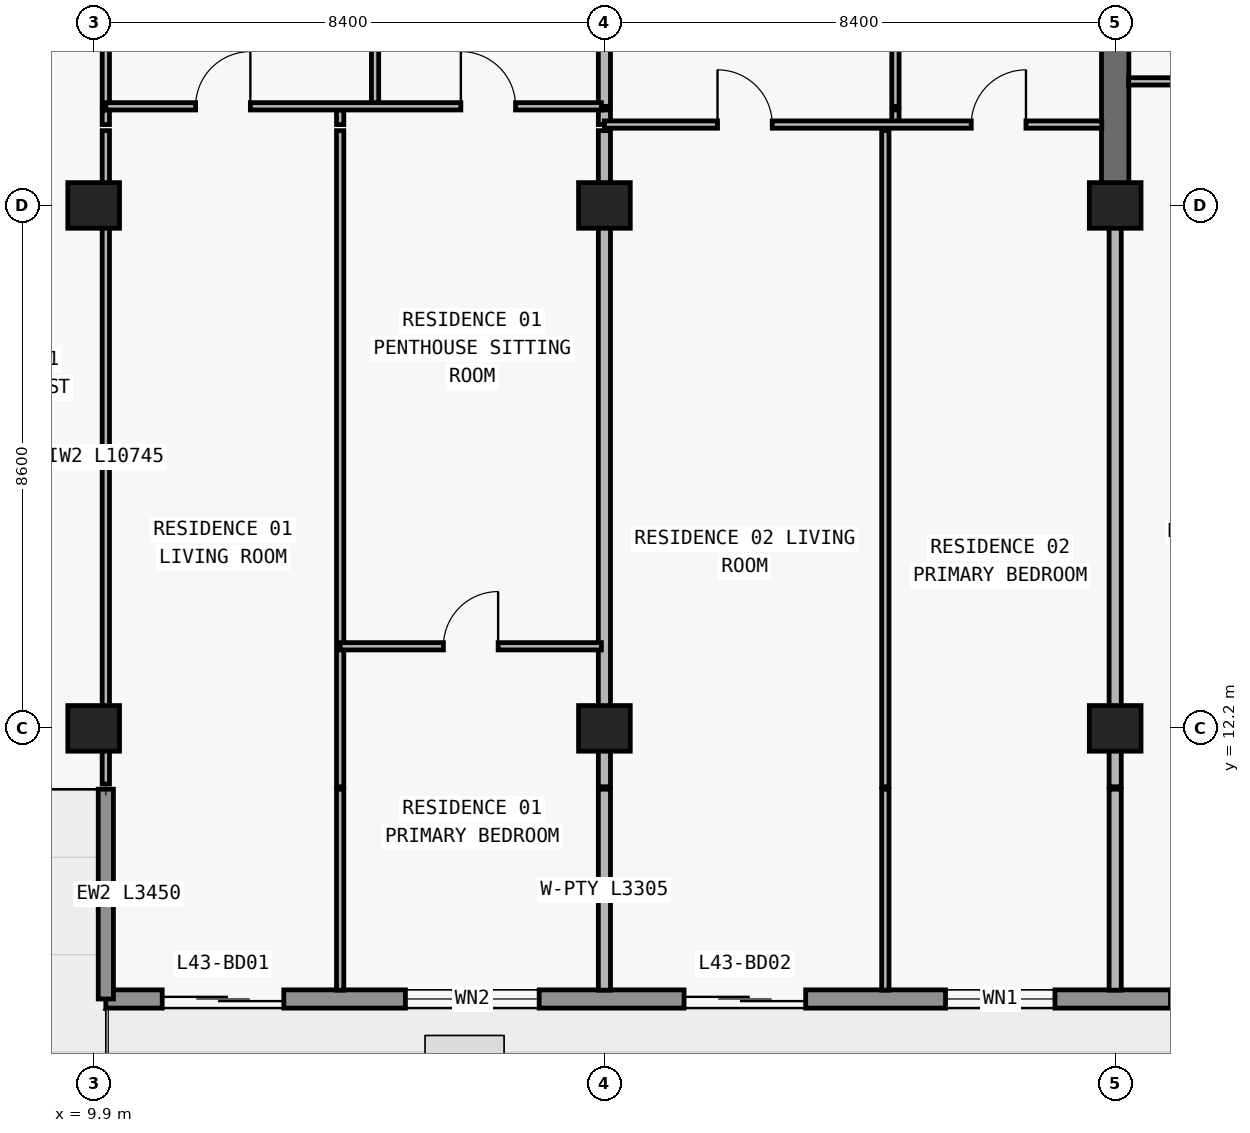
"""IFC4 building model, lengths in metres.
Left out: names, types, materials, properties, quantities, classifications, styles, units other than length and angle.
Written with IfcOpenShell. Run it as: python <this file> out.ifc"""

import sys

from ifc_helpers import new_model, si_unit, direction, frame, frame_2d, origin, origin_2d, place, context, subcontext, project, spatial, rectangle, extrude, element, fill, save


model = new_model("IFC4")
c1 = context("Model", 3, precision=1e-05, world=origin(), true_north=direction((0.0, 1.0)))
c2 = subcontext(c1, "Body", "Model", "MODEL_VIEW")
j1 = project(units=[si_unit("LENGTHUNIT", "METRE"), si_unit("PLANEANGLEUNIT", "RADIAN")], contexts=[c1])
p1 = place(None, origin())
s1 = spatial("IfcSite", under=j1, at=p1, CompositionType="ELEMENT")
p2 = place(p1, origin())
s2 = spatial("IfcBuilding", under=s1, at=p2, CompositionType="ELEMENT")
p3 = place(p2, frame((0.0, 0.0, 157.2)))
s3 = spatial("IfcBuildingStorey", under=s2, at=p3, CompositionType="ELEMENT", Elevation=157.2)
for number, where, z_axis, x_axis in (
    (1, (9.9, 12.2, 0.0), (0.0, 0.0, 1.0), (1.0, 0.0, 0.0)),
    (2, (18.3, 12.2, 0.0), (0.0, 0.0, 1.0), (1.0, 0.0, 0.0)),
    (3, (26.7, 12.2, 0.0), (0.0, 0.0, 1.0), (1.0, 0.0, 0.0)),
    (4, (9.9, 20.8, 0.0), (0.0, 0.0, 1.0), (1.0, 0.0, 0.0)),
    (5, (18.3, 20.8, 0.0), (0.0, 0.0, 1.0), (1.0, 0.0, 0.0)),
    (6, (26.7, 20.8, 0.0), (0.0, 0.0, 1.0), (1.0, 0.0, 0.0)),
):
    element("IfcColumn", number, at=place(p3, frame(where, z_axis=z_axis, x_axis=x_axis)), inside=s3, PredefinedType="COLUMN", context=c2, shape_type="SweptSolid", body=[
        extrude(rectangle(XDim=0.85, YDim=0.75, at=origin_2d()), origin(), (0.0, 0.0, 1.0), 3.05),
    ])
p4 = place(p3, frame((26.7, 20.8, 0.0), z_axis=(0.0, 0.0, 1.0), x_axis=(0.0, 1.0, 0.0)))
e7 = element("IfcWall", 7, at=p4, inside=s3, PredefinedType="SHEAR", context=c2, shape_type="SweptSolid", body=[
    extrude(rectangle(XDim=8.6, YDim=0.45, at=frame_2d((4.3, 0.0))), origin(), (0.0, 0.0, 1.0), 3.05),
])
p5 = place(p3, frame((67.7, 7.75, 0.0), z_axis=(0.0, 0.0, 1.0), x_axis=(-1.0, 0.0, 0.0)))
e8 = element("IfcWall", 8, at=p5, inside=s3, PredefinedType="STANDARD", context=c2, shape_type="SweptSolid", body=[
    extrude(rectangle(XDim=57.6, YDim=0.3, at=frame_2d((28.8, 0.0))), origin(), (0.0, 0.0, 1.0), 3.05),
])
p6 = place(p5, frame((54.673, 0.0, 0.0)))
e9 = element("IfcOpeningElement", 9, at=p6, cuts=e8, PredefinedType="OPENING", context=c2, shape_type="SweptSolid", body=[
    extrude(rectangle(XDim=2.0, YDim=2.3, at=frame_2d((1.0, 1.15))), frame((0.0, 0.16, 0.0), z_axis=(0.0, -1.0, 0.0), x_axis=(1.0, 0.0, 0.0)), (0.0, 0.0, 1.0), 0.32),
])
p7 = place(p5, frame((50.473, 0.0, 0.85)))
e10 = element("IfcOpeningElement", 10, at=p7, cuts=e8, PredefinedType="OPENING", context=c2, shape_type="SweptSolid", body=[
    extrude(rectangle(XDim=2.2, YDim=1.55, at=frame_2d((1.1, 0.775))), frame((0.0, 0.16, 0.0), z_axis=(0.0, -1.0, 0.0), x_axis=(1.0, 0.0, 0.0)), (0.0, 0.0, 1.0), 0.32),
])
p8 = place(p5, frame((46.09, 0.0, 0.0)))
e11 = element("IfcOpeningElement", 11, at=p8, cuts=e8, PredefinedType="OPENING", context=c2, shape_type="SweptSolid", body=[
    extrude(rectangle(XDim=2.0, YDim=2.3, at=frame_2d((1.0, 1.15))), frame((0.0, 0.16, 0.0), z_axis=(0.0, -1.0, 0.0), x_axis=(1.0, 0.0, 0.0)), (0.0, 0.0, 1.0), 0.32),
])
p9 = place(p5, frame((41.99, 0.0, 0.85)))
e12 = element("IfcOpeningElement", 12, at=p9, cuts=e8, PredefinedType="OPENING", context=c2, shape_type="SweptSolid", body=[
    extrude(rectangle(XDim=1.8, YDim=1.55, at=frame_2d((0.9, 0.775))), frame((0.0, 0.16, 0.0), z_axis=(0.0, -1.0, 0.0), x_axis=(1.0, 0.0, 0.0)), (0.0, 0.0, 1.0), 0.32),
])
p10 = place(p5, frame((38.09, 0.0, 0.0)))
e13 = element("IfcOpeningElement", 13, at=p10, cuts=e8, PredefinedType="OPENING", context=c2, shape_type="SweptSolid", body=[
    extrude(rectangle(XDim=2.0, YDim=2.3, at=frame_2d((1.0, 1.15))), frame((0.0, 0.16, 0.0), z_axis=(0.0, -1.0, 0.0), x_axis=(1.0, 0.0, 0.0)), (0.0, 0.0, 1.0), 0.32),
])
p11 = place(p5, frame((33.41, 0.0, 0.65)))
e14 = element("IfcOpeningElement", 14, at=p11, cuts=e8, PredefinedType="OPENING", context=c2, shape_type="SweptSolid", body=[
    extrude(rectangle(XDim=2.6, YDim=1.85, at=frame_2d((1.3, 0.925))), frame((0.0, 0.16, 0.0), z_axis=(0.0, -1.0, 0.0), x_axis=(1.0, 0.0, 0.0)), (0.0, 0.0, 1.0), 0.32),
])
p12 = place(p5, frame((27.7, 0.0, 0.85)))
e15 = element("IfcOpeningElement", 15, at=p12, cuts=e8, PredefinedType="OPENING", context=c2, shape_type="SweptSolid", body=[
    extrude(rectangle(XDim=2.2, YDim=1.55, at=frame_2d((1.1, 0.775))), frame((0.0, 0.16, 0.0), z_axis=(0.0, -1.0, 0.0), x_axis=(1.0, 0.0, 0.0)), (0.0, 0.0, 1.0), 0.32),
])
p13 = place(p5, frame((21.69, 0.0, 0.0)))
e16 = element("IfcOpeningElement", 16, at=p13, cuts=e8, PredefinedType="OPENING", context=c2, shape_type="SweptSolid", body=[
    extrude(rectangle(XDim=2.0, YDim=2.3, at=frame_2d((1.0, 1.15))), frame((0.0, 0.16, 0.0), z_axis=(0.0, -1.0, 0.0), x_axis=(1.0, 0.0, 0.0)), (0.0, 0.0, 1.0), 0.32),
])
p14 = place(p5, frame((17.59, 0.0, 0.85)))
e17 = element("IfcOpeningElement", 17, at=p14, cuts=e8, PredefinedType="OPENING", context=c2, shape_type="SweptSolid", body=[
    extrude(rectangle(XDim=1.8, YDim=1.55, at=frame_2d((0.9, 0.775))), frame((0.0, 0.16, 0.0), z_axis=(0.0, -1.0, 0.0), x_axis=(1.0, 0.0, 0.0)), (0.0, 0.0, 1.0), 0.32),
])
p15 = place(p5, frame((13.626, 0.0, 0.0)))
e18 = element("IfcOpeningElement", 18, at=p15, cuts=e8, PredefinedType="OPENING", context=c2, shape_type="SweptSolid", body=[
    extrude(rectangle(XDim=2.0, YDim=2.3, at=frame_2d((1.0, 1.15))), frame((0.0, 0.16, 0.0), z_axis=(0.0, -1.0, 0.0), x_axis=(1.0, 0.0, 0.0)), (0.0, 0.0, 1.0), 0.32),
])
p16 = place(p5, frame((9.326, 0.0, 0.85)))
e19 = element("IfcOpeningElement", 19, at=p16, cuts=e8, PredefinedType="OPENING", context=c2, shape_type="SweptSolid", body=[
    extrude(rectangle(XDim=2.2, YDim=1.55, at=frame_2d((1.1, 0.775))), frame((0.0, 0.16, 0.0), z_axis=(0.0, -1.0, 0.0), x_axis=(1.0, 0.0, 0.0)), (0.0, 0.0, 1.0), 0.32),
])
p17 = place(p5, frame((4.945, 0.0, 0.0)))
e20 = element("IfcOpeningElement", 20, at=p17, cuts=e8, PredefinedType="OPENING", context=c2, shape_type="SweptSolid", body=[
    extrude(rectangle(XDim=2.0, YDim=2.3, at=frame_2d((1.0, 1.15))), frame((0.0, 0.16, 0.0), z_axis=(0.0, -1.0, 0.0), x_axis=(1.0, 0.0, 0.0)), (0.0, 0.0, 1.0), 0.32),
])
p18 = place(p5, frame((0.945, 0.0, 0.85)))
e21 = element("IfcOpeningElement", 21, at=p18, cuts=e8, PredefinedType="OPENING", context=c2, shape_type="SweptSolid", body=[
    extrude(rectangle(XDim=1.8, YDim=1.55, at=frame_2d((0.9, 0.775))), frame((0.0, 0.16, 0.0), z_axis=(0.0, -1.0, 0.0), x_axis=(1.0, 0.0, 0.0)), (0.0, 0.0, 1.0), 0.32),
])
p19 = place(p3, frame((10.1, 11.2, 0.0), z_axis=(0.0, 0.0, 1.0), x_axis=(0.0, -1.0, 0.0)))
e22 = element("IfcWall", 22, at=p19, inside=s3, PredefinedType="ELEMENTEDWALL", context=c2, shape_type="SweptSolid", body=[
    extrude(rectangle(XDim=3.45, YDim=0.25, at=frame_2d((1.725, 0.0))), origin(), (0.0, 0.0, 1.0), 3.05),
])
p20 = place(p3, frame((10.1, 11.285, 0.0), z_axis=(0.0, 0.0, 1.0), x_axis=(0.0, 1.0, 0.0)))
e23 = element("IfcWall", 23, at=p20, inside=s3, PredefinedType="PARTITIONING", context=c2, shape_type="SweptSolid", body=[
    extrude(rectangle(XDim=10.745, YDim=0.12, at=frame_2d((5.373, 0.0))), origin(), (0.0, 0.0, 1.0), 2.263),
])
p21 = place(p3, frame((10.1, 22.13, 0.0), z_axis=(0.0, 0.0, 1.0), x_axis=(0.0, 1.0, 0.0)))
e24 = element("IfcWall", 24, at=p21, inside=s3, PredefinedType="PARTITIONING", context=c2, shape_type="SweptSolid", body=[
    extrude(rectangle(XDim=0.24, YDim=0.12, at=frame_2d((0.12, 0.0))), origin(), (0.0, 0.0, 1.0), 2.263),
])
p22 = place(p3, frame((10.1, 22.43, 0.0), z_axis=(0.0, 0.0, 1.0), x_axis=(0.0, 1.0, 0.0)))
e25 = element("IfcWall", 25, at=p22, inside=s3, PredefinedType="PARTITIONING", context=c2, shape_type="SweptSolid", body=[
    extrude(rectangle(XDim=4.75, YDim=0.12, at=frame_2d((2.375, 0.0))), origin(), (0.0, 0.0, 1.0), 2.263),
])
p23 = place(p22, frame((1.925, 0.0, 0.0)))
e26 = element("IfcOpeningElement", 26, at=p23, cuts=e25, PredefinedType="OPENING", context=c2, shape_type="SweptSolid", body=[
    extrude(rectangle(XDim=0.9, YDim=2.15, at=frame_2d((0.45, 1.075))), frame((0.0, 0.07, 0.0), z_axis=(0.0, -1.0, 0.0), x_axis=(1.0, 0.0, 0.0)), (0.0, 0.0, 1.0), 0.14),
])
p24 = place(p3, frame((13.954, 7.895, 0.0), z_axis=(0.0, 0.0, 1.0), x_axis=(0.0, 1.0, 0.0)))
e27 = element("IfcWall", 27, at=p24, inside=s3, PredefinedType="PARTITIONING", context=c2, shape_type="SweptSolid", body=[
    extrude(rectangle(XDim=3.305, YDim=0.12, at=frame_2d((1.652, 0.0))), origin(), (0.0, 0.0, 1.0), 3.05),
])
p25 = place(p3, frame((13.954, 11.24, 0.0), z_axis=(0.0, 0.0, 1.0), x_axis=(0.0, 1.0, 0.0)))
e28 = element("IfcWall", 28, at=p25, inside=s3, PredefinedType="PARTITIONING", context=c2, shape_type="SweptSolid", body=[
    extrude(rectangle(XDim=10.79, YDim=0.12, at=frame_2d((5.395, 0.0))), origin(), (0.0, 0.0, 1.0), 2.725),
])
p26 = place(p3, frame((13.954, 22.13, 0.0), z_axis=(0.0, 0.0, 1.0), x_axis=(0.0, 1.0, 0.0)))
e29 = element("IfcWall", 29, at=p26, inside=s3, PredefinedType="PARTITIONING", context=c2, shape_type="SweptSolid", body=[
    extrude(rectangle(XDim=0.24, YDim=0.12, at=frame_2d((0.12, 0.0))), origin(), (0.0, 0.0, 1.0), 2.725),
])
p27 = place(p3, frame((14.528, 22.43, 0.0), z_axis=(0.0, 0.0, 1.0), x_axis=(0.0, 1.0, 0.0)))
e30 = element("IfcWall", 30, at=p27, inside=s3, PredefinedType="PARTITIONING", context=c2, shape_type="SweptSolid", body=[
    extrude(rectangle(XDim=4.75, YDim=0.12, at=frame_2d((2.375, 0.0))), origin(), (0.0, 0.0, 1.0), 3.05),
])
p28 = place(p27, frame((1.925, 0.0, 0.0)))
e31 = element("IfcOpeningElement", 31, at=p28, cuts=e30, PredefinedType="OPENING", context=c2, shape_type="SweptSolid", body=[
    extrude(rectangle(XDim=0.9, YDim=2.15, at=frame_2d((0.45, 1.075))), frame((0.0, 0.07, 0.0), z_axis=(0.0, -1.0, 0.0), x_axis=(1.0, 0.0, 0.0)), (0.0, 0.0, 1.0), 0.14),
])
p29 = place(p3, frame((18.3, 7.895, 0.0), z_axis=(0.0, 0.0, 1.0), x_axis=(0.0, 1.0, 0.0)))
e32 = element("IfcWall", 32, at=p29, inside=s3, PredefinedType="PARTITIONING", context=c2, shape_type="SweptSolid", body=[
    extrude(rectangle(XDim=3.305, YDim=0.2, at=frame_2d((1.652, 0.0))), origin(), (0.0, 0.0, 1.0), 3.05),
])
p30 = place(p3, frame((18.3, 11.24, 0.0), z_axis=(0.0, 0.0, 1.0), x_axis=(0.0, 1.0, 0.0)))
e33 = element("IfcWall", 33, at=p30, inside=s3, PredefinedType="PARTITIONING", context=c2, shape_type="SweptSolid", body=[
    extrude(rectangle(XDim=10.79, YDim=0.2, at=frame_2d((5.395, 0.0))), origin(), (0.0, 0.0, 1.0), 2.263),
])
p31 = place(p3, frame((18.3, 22.13, 0.0), z_axis=(0.0, 0.0, 1.0), x_axis=(0.0, 1.0, 0.0)))
e34 = element("IfcWall", 34, at=p31, inside=s3, PredefinedType="PARTITIONING", context=c2, shape_type="SweptSolid", body=[
    extrude(rectangle(XDim=0.24, YDim=0.2, at=frame_2d((0.12, 0.0))), origin(), (0.0, 0.0, 1.0), 2.263),
])
p32 = place(p3, frame((18.3, 22.43, 0.0), z_axis=(0.0, 0.0, 1.0), x_axis=(0.0, 1.0, 0.0)))
e35 = element("IfcWall", 35, at=p32, inside=s3, PredefinedType="PARTITIONING", context=c2, shape_type="SweptSolid", body=[
    extrude(rectangle(XDim=4.75, YDim=0.2, at=frame_2d((2.375, 0.0))), origin(), (0.0, 0.0, 1.0), 2.263),
])
p33 = place(p3, frame((22.92, 7.895, 0.0), z_axis=(0.0, 0.0, 1.0), x_axis=(0.0, 1.0, 0.0)))
e36 = element("IfcWall", 36, at=p33, inside=s3, PredefinedType="PARTITIONING", context=c2, shape_type="SweptSolid", body=[
    extrude(rectangle(XDim=3.305, YDim=0.12, at=frame_2d((1.652, 0.0))), origin(), (0.0, 0.0, 1.0), 3.05),
])
p34 = place(p3, frame((22.92, 11.24, 0.0), z_axis=(0.0, 0.0, 1.0), x_axis=(0.0, 1.0, 0.0)))
e37 = element("IfcWall", 37, at=p34, inside=s3, PredefinedType="PARTITIONING", context=c2, shape_type="SweptSolid", body=[
    extrude(rectangle(XDim=10.79, YDim=0.12, at=frame_2d((5.395, 0.0))), origin(), (0.0, 0.0, 1.0), 3.05),
])
p35 = place(p3, frame((23.086, 22.13, 0.0), z_axis=(0.0, 0.0, 1.0), x_axis=(0.0, 1.0, 0.0)))
e38 = element("IfcWall", 38, at=p35, inside=s3, PredefinedType="PARTITIONING", context=c2, shape_type="SweptSolid", body=[
    extrude(rectangle(XDim=0.24, YDim=0.12, at=frame_2d((0.12, 0.0))), origin(), (0.0, 0.0, 1.0), 3.05),
])
p36 = place(p3, frame((23.086, 22.43, 0.0), z_axis=(0.0, 0.0, 1.0), x_axis=(0.0, 1.0, 0.0)))
e39 = element("IfcWall", 39, at=p36, inside=s3, PredefinedType="PARTITIONING", context=c2, shape_type="SweptSolid", body=[
    extrude(rectangle(XDim=4.75, YDim=0.12, at=frame_2d((2.375, 0.0))), origin(), (0.0, 0.0, 1.0), 3.05),
])
p37 = place(p36, frame((1.925, 0.0, 0.0)))
e40 = element("IfcOpeningElement", 40, at=p37, cuts=e39, PredefinedType="OPENING", context=c2, shape_type="SweptSolid", body=[
    extrude(rectangle(XDim=0.9, YDim=2.15, at=frame_2d((0.45, 1.075))), frame((0.0, 0.07, 0.0), z_axis=(0.0, -1.0, 0.0), x_axis=(1.0, 0.0, 0.0)), (0.0, 0.0, 1.0), 0.14),
])
p38 = place(p3, frame((26.7, 7.895, 0.0), z_axis=(0.0, 0.0, 1.0), x_axis=(0.0, 1.0, 0.0)))
e41 = element("IfcWall", 41, at=p38, inside=s3, PredefinedType="PARTITIONING", context=c2, shape_type="SweptSolid", body=[
    extrude(rectangle(XDim=3.305, YDim=0.2, at=frame_2d((1.652, 0.0))), origin(), (0.0, 0.0, 1.0), 3.05),
])
p39 = place(p3, frame((26.7, 11.24, 0.0), z_axis=(0.0, 0.0, 1.0), x_axis=(0.0, 1.0, 0.0)))
e42 = element("IfcWall", 42, at=p39, inside=s3, PredefinedType="PARTITIONING", context=c2, shape_type="SweptSolid", body=[
    extrude(rectangle(XDim=9.555, YDim=0.2, at=frame_2d((4.777, 0.0))), origin(), (0.0, 0.0, 1.0), 2.263),
])
p40 = place(p3, frame((13.954, 13.55, 0.0), z_axis=(0.0, 0.0, 1.0), x_axis=(1.0, 0.0, 0.0)))
e43 = element("IfcWall", 43, at=p40, inside=s3, PredefinedType="PARTITIONING", context=c2, shape_type="SweptSolid", body=[
    extrude(rectangle(XDim=4.296, YDim=0.12, at=frame_2d((2.148, 0.0))), origin(), (0.0, 0.0, 1.0), 3.05),
])
p41 = place(p40, frame((1.698, 0.0, 0.0)))
e44 = element("IfcOpeningElement", 44, at=p41, cuts=e43, PredefinedType="OPENING", context=c2, shape_type="SweptSolid", body=[
    extrude(rectangle(XDim=0.9, YDim=2.15, at=frame_2d((0.45, 1.075))), frame((0.0, 0.07, 0.0), z_axis=(0.0, -1.0, 0.0), x_axis=(1.0, 0.0, 0.0)), (0.0, 0.0, 1.0), 0.14),
])
p42 = place(p3, frame((18.3, 22.13, 0.0), z_axis=(0.0, 0.0, 1.0), x_axis=(1.0, 0.0, 0.0)))
e45 = element("IfcWall", 45, at=p42, inside=s3, PredefinedType="PARTITIONING", context=c2, shape_type="SweptSolid", body=[
    extrude(rectangle(XDim=8.18, YDim=0.12, at=frame_2d((4.09, 0.0))), origin(), (0.0, 0.0, 1.0), 3.05),
])
p43 = place(p42, frame((1.86, 0.0, 0.0)))
e46 = element("IfcOpeningElement", 46, at=p43, cuts=e45, PredefinedType="OPENING", context=c2, shape_type="SweptSolid", body=[
    extrude(rectangle(XDim=0.9, YDim=2.15, at=frame_2d((0.45, 1.075))), frame((0.0, 0.07, 0.0), z_axis=(0.0, -1.0, 0.0), x_axis=(1.0, 0.0, 0.0)), (0.0, 0.0, 1.0), 0.14),
])
p44 = place(p42, frame((6.033, 0.0, 0.0)))
e47 = element("IfcOpeningElement", 47, at=p44, cuts=e45, PredefinedType="OPENING", context=c2, shape_type="SweptSolid", body=[
    extrude(rectangle(XDim=0.9, YDim=2.15, at=frame_2d((0.45, 1.075))), frame((0.0, 0.07, 0.0), z_axis=(0.0, -1.0, 0.0), x_axis=(1.0, 0.0, 0.0)), (0.0, 0.0, 1.0), 0.14),
])
p45 = place(p3, frame((10.1, 22.43, 0.0), z_axis=(0.0, 0.0, 1.0), x_axis=(1.0, 0.0, 0.0)))
e48 = element("IfcWall", 48, at=p45, inside=s3, PredefinedType="PARTITIONING", context=c2, shape_type="SweptSolid", body=[
    extrude(rectangle(XDim=8.15, YDim=0.12, at=frame_2d((4.075, 0.0))), origin(), (0.0, 0.0, 1.0), 3.05),
])
p46 = place(p45, frame((1.477, 0.0, 0.0)))
e49 = element("IfcOpeningElement", 49, at=p46, cuts=e48, PredefinedType="OPENING", context=c2, shape_type="SweptSolid", body=[
    extrude(rectangle(XDim=0.9, YDim=2.15, at=frame_2d((0.45, 1.075))), frame((0.0, 0.07, 0.0), z_axis=(0.0, -1.0, 0.0), x_axis=(1.0, 0.0, 0.0)), (0.0, 0.0, 1.0), 0.14),
])
p47 = place(p45, frame((5.839, 0.0, 0.0)))
e50 = element("IfcOpeningElement", 50, at=p47, cuts=e48, PredefinedType="OPENING", context=c2, shape_type="SweptSolid", body=[
    extrude(rectangle(XDim=0.9, YDim=2.15, at=frame_2d((0.45, 1.075))), frame((0.0, 0.07, 0.0), z_axis=(0.0, -1.0, 0.0), x_axis=(1.0, 0.0, 0.0)), (0.0, 0.0, 1.0), 0.14),
])
p48 = place(p3, frame((26.92, 22.84, 0.0), z_axis=(0.0, 0.0, 1.0), x_axis=(1.0, 0.0, 0.0)))
e51 = element("IfcWall", 51, at=p48, inside=s3, PredefinedType="PARTITIONING", context=c2, shape_type="SweptSolid", body=[
    extrude(rectangle(XDim=8.18, YDim=0.12, at=frame_2d((4.09, 0.0))), origin(), (0.0, 0.0, 1.0), 3.05),
])
p49 = place(p48, frame((1.33, 0.0, 0.0)))
e52 = element("IfcOpeningElement", 52, at=p49, cuts=e51, PredefinedType="OPENING", context=c2, shape_type="SweptSolid", body=[
    extrude(rectangle(XDim=0.9, YDim=2.15, at=frame_2d((0.45, 1.075))), frame((0.0, 0.07, 0.0), z_axis=(0.0, -1.0, 0.0), x_axis=(1.0, 0.0, 0.0)), (0.0, 0.0, 1.0), 0.14),
])
p50 = place(p6, origin())
e53 = element("IfcDoor", 53, at=p50, inside=s3, OperationType="DOUBLE_DOOR_SLIDING", PredefinedType="DOOR", context=c2, shape_type="SweptSolid", body=[
    extrude(rectangle(XDim=2.0, YDim=2.3, at=frame_2d((1.0, 1.15))), frame((0.0, 0.025, 0.0), z_axis=(0.0, -1.0, 0.0), x_axis=(1.0, 0.0, 0.0)), (0.0, 0.0, 1.0), 0.05),
])
fill(e9, e53)
p51 = place(p7, origin())
e54 = element("IfcWindow", 54, at=p51, inside=s3, PartitioningType="SINGLE_PANEL", PredefinedType="WINDOW", context=c2, shape_type="SweptSolid", body=[
    extrude(rectangle(XDim=2.2, YDim=1.55, at=frame_2d((1.1, 0.775))), frame((0.0, 0.03, 0.0), z_axis=(0.0, -1.0, 0.0), x_axis=(1.0, 0.0, 0.0)), (0.0, 0.0, 1.0), 0.06),
])
fill(e10, e54)
p52 = place(p8, origin())
e55 = element("IfcDoor", 55, at=p52, inside=s3, OperationType="DOUBLE_DOOR_SLIDING", PredefinedType="DOOR", context=c2, shape_type="SweptSolid", body=[
    extrude(rectangle(XDim=2.0, YDim=2.3, at=frame_2d((1.0, 1.15))), frame((0.0, 0.025, 0.0), z_axis=(0.0, -1.0, 0.0), x_axis=(1.0, 0.0, 0.0)), (0.0, 0.0, 1.0), 0.05),
])
fill(e11, e55)
p53 = place(p9, origin())
e56 = element("IfcWindow", 56, at=p53, inside=s3, PartitioningType="SINGLE_PANEL", PredefinedType="WINDOW", context=c2, shape_type="SweptSolid", body=[
    extrude(rectangle(XDim=1.8, YDim=1.55, at=frame_2d((0.9, 0.775))), frame((0.0, 0.03, 0.0), z_axis=(0.0, -1.0, 0.0), x_axis=(1.0, 0.0, 0.0)), (0.0, 0.0, 1.0), 0.06),
])
fill(e12, e56)
p54 = place(p46, origin())
e57 = element("IfcDoor", 57, at=p54, inside=s3, OperationType="SINGLE_SWING_RIGHT", PredefinedType="DOOR", context=c2, shape_type="SweptSolid", body=[
    extrude(rectangle(XDim=0.9, YDim=2.15, at=frame_2d((0.45, 1.075))), frame((0.0, 0.025, 0.0), z_axis=(0.0, -1.0, 0.0), x_axis=(1.0, 0.0, 0.0)), (0.0, 0.0, 1.0), 0.05),
])
fill(e49, e57)
p55 = place(p47, origin())
e58 = element("IfcDoor", 58, at=p55, inside=s3, OperationType="SINGLE_SWING_LEFT", PredefinedType="DOOR", context=c2, shape_type="SweptSolid", body=[
    extrude(rectangle(XDim=0.9, YDim=2.15, at=frame_2d((0.45, 1.075))), frame((0.0, 0.025, 0.0), z_axis=(0.0, -1.0, 0.0), x_axis=(1.0, 0.0, 0.0)), (0.0, 0.0, 1.0), 0.05),
])
fill(e50, e58)
p56 = place(p41, origin())
e59 = element("IfcDoor", 59, at=p56, inside=s3, OperationType="SINGLE_SWING_RIGHT", PredefinedType="DOOR", context=c2, shape_type="SweptSolid", body=[
    extrude(rectangle(XDim=0.9, YDim=2.15, at=frame_2d((0.45, 1.075))), frame((0.0, 0.025, 0.0), z_axis=(0.0, -1.0, 0.0), x_axis=(1.0, 0.0, 0.0)), (0.0, 0.0, 1.0), 0.05),
])
fill(e44, e59)
p57 = place(p43, origin())
e60 = element("IfcDoor", 60, at=p57, inside=s3, OperationType="SINGLE_SWING_LEFT", PredefinedType="DOOR", context=c2, shape_type="SweptSolid", body=[
    extrude(rectangle(XDim=0.9, YDim=2.15, at=frame_2d((0.45, 1.075))), frame((0.0, 0.025, 0.0), z_axis=(0.0, -1.0, 0.0), x_axis=(1.0, 0.0, 0.0)), (0.0, 0.0, 1.0), 0.05),
])
fill(e46, e60)
p58 = place(p44, origin())
e61 = element("IfcDoor", 61, at=p58, inside=s3, OperationType="SINGLE_SWING_RIGHT", PredefinedType="DOOR", context=c2, shape_type="SweptSolid", body=[
    extrude(rectangle(XDim=0.9, YDim=2.15, at=frame_2d((0.45, 1.075))), frame((0.0, 0.025, 0.0), z_axis=(0.0, -1.0, 0.0), x_axis=(1.0, 0.0, 0.0)), (0.0, 0.0, 1.0), 0.05),
])
fill(e47, e61)
save(model, sys.argv[1])
